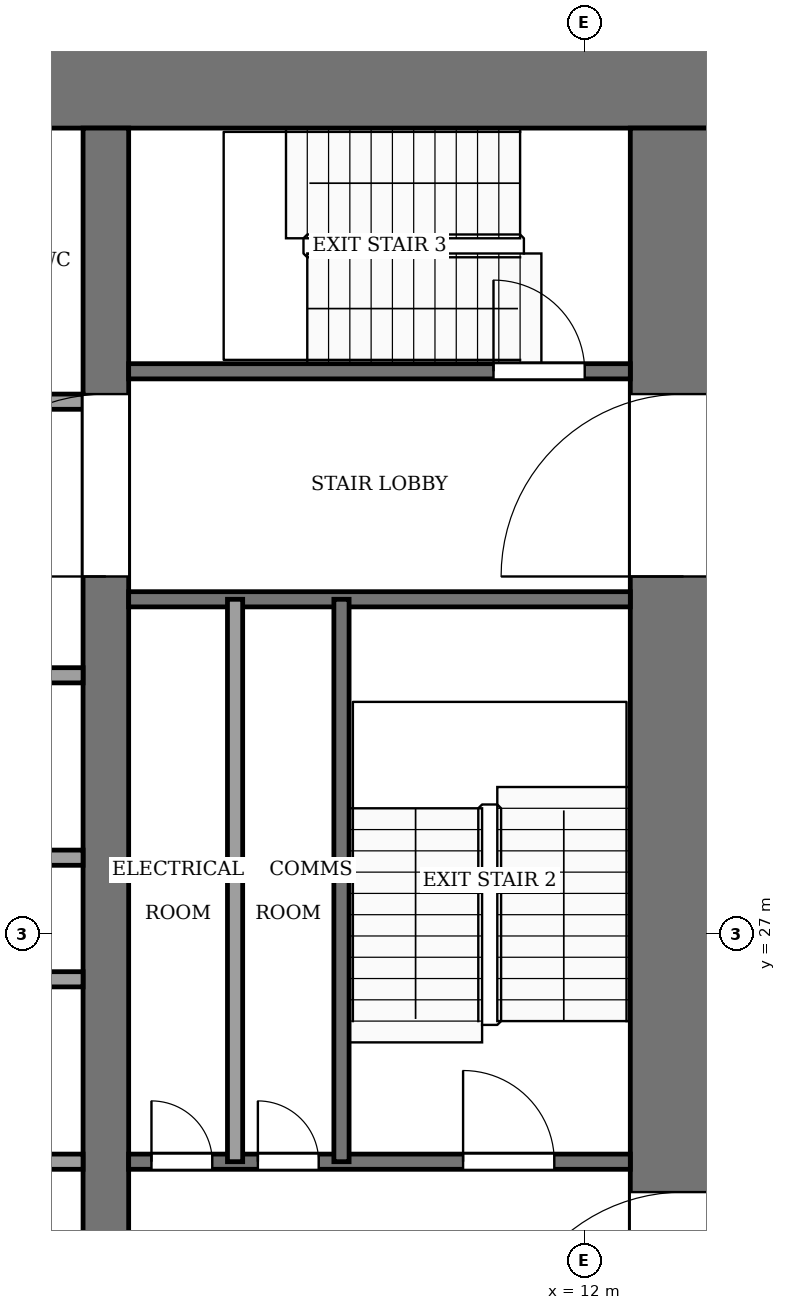
"""IFC4 building model, lengths in metres.
Left out: names, types, materials, properties, quantities, classifications, styles, units other than length and angle.
Written with IfcOpenShell. Run it as: python <this file> out.ifc"""

import sys

from ifc_helpers import new_model, si_unit, direction, frame, frame_2d, origin, place, context, subcontext, project, spatial, rectangle, extrude, element, fill, save


model = new_model("IFC4")
c1 = context("Model", 3, precision=1e-05, world=origin(), true_north=direction((0.0, 1.0)))
c2 = subcontext(c1, "Body", "Model", "MODEL_VIEW")
j1 = project(units=[si_unit("LENGTHUNIT", "METRE"), si_unit("PLANEANGLEUNIT", "RADIAN")], contexts=[c1])
p1 = place(None, origin())
s1 = spatial("IfcSite", under=j1, at=p1, CompositionType="ELEMENT")
p2 = place(p1, origin())
s2 = spatial("IfcBuilding", under=s1, at=p2, CompositionType="ELEMENT")
p3 = place(p2, frame((0.0, 0.0, 42.0)))
s3 = spatial("IfcBuildingStorey", under=s2, at=p3, CompositionType="ELEMENT", Elevation=42.0)
p4 = place(p3, frame((-14.0, 38.3, -0.13), z_axis=(0.0, 0.0, 1.0), x_axis=(1.0, 0.0, 0.0)))
e1 = element("IfcWall", 1, at=p4, inside=s3, PredefinedType="SHEAR", context=c2, shape_type="SweptSolid", body=[
    extrude(rectangle(XDim=28.0, YDim=1.4, at=frame_2d((14.0, 0.0))), origin(), (0.0, 0.0, 1.0), 4.0),
])
p5 = place(p3, frame((13.3, 18.4, -0.13), z_axis=(0.0, 0.0, 1.0), x_axis=(0.0, 1.0, 0.0)))
e2 = element("IfcWall", 2, at=p5, inside=s3, PredefinedType="SHEAR", context=c2, shape_type="SweptSolid", body=[
    extrude(rectangle(XDim=19.2, YDim=1.4, at=frame_2d((9.6, 0.0))), origin(), (0.0, 0.0, 1.0), 4.0),
])
p6 = place(p5, frame((2.8, 0.0, 0.13)))
e3 = element("IfcOpeningElement", 3, at=p6, cuts=e2, PredefinedType="OPENING", context=c2, shape_type="SweptSolid", body=[
    extrude(rectangle(XDim=2.4, YDim=2.4, at=frame_2d((1.2, 1.2))), frame((0.0, 0.71, 0.0), z_axis=(0.0, -1.0, 0.0), x_axis=(1.0, 0.0, 0.0)), (0.0, 0.0, 1.0), 1.42),
])
p7 = place(p5, frame((13.3, 0.0, 0.13)))
e4 = element("IfcOpeningElement", 4, at=p7, cuts=e2, PredefinedType="OPENING", context=c2, shape_type="SweptSolid", body=[
    extrude(rectangle(XDim=2.4, YDim=2.4, at=frame_2d((1.2, 1.2))), frame((0.0, 0.71, 0.0), z_axis=(0.0, -1.0, 0.0), x_axis=(1.0, 0.0, 0.0)), (0.0, 0.0, 1.0), 1.42),
])
p8 = place(p3, frame((5.7, 18.4, -0.13), z_axis=(0.0, 0.0, 1.0), x_axis=(0.0, 1.0, 0.0)))
e5 = element("IfcWall", 5, at=p8, inside=s3, PredefinedType="SHEAR", context=c2, shape_type="SweptSolid", body=[
    extrude(rectangle(XDim=19.2, YDim=0.6, at=frame_2d((9.6, 0.0))), origin(), (0.0, 0.0, 1.0), 4.0),
])
p9 = place(p8, frame((13.3, 0.0, 0.13)))
e6 = element("IfcOpeningElement", 6, at=p9, cuts=e5, PredefinedType="OPENING", context=c2, shape_type="SweptSolid", body=[
    extrude(rectangle(XDim=2.4, YDim=2.4, at=frame_2d((1.2, 1.2))), frame((0.0, 0.31, 0.0), z_axis=(0.0, -1.0, 0.0), x_axis=(1.0, 0.0, 0.0)), (0.0, 0.0, 1.0), 0.62),
])
p10 = place(p3, frame((-5.4, 24.0, 0.0), z_axis=(0.0, 0.0, 1.0), x_axis=(1.0, 0.0, 0.0)))
e7 = element("IfcWall", 7, at=p10, inside=s3, PredefinedType="PARTITIONING", context=c2, shape_type="SweptSolid", body=[
    extrude(rectangle(XDim=10.8, YDim=0.2, at=frame_2d((5.4, 0.0))), origin(), (0.0, 0.0, 1.0), 3.87),
])
p11 = place(p10, frame((0.75, 0.0, 0.0)))
e8 = element("IfcOpeningElement", 8, at=p11, cuts=e7, PredefinedType="OPENING", context=c2, shape_type="SweptSolid", body=[
    extrude(rectangle(XDim=1.2, YDim=2.2, at=frame_2d((0.6, 1.1))), frame((0.0, 0.11, 0.0), z_axis=(0.0, -1.0, 0.0), x_axis=(1.0, 0.0, 0.0)), (0.0, 0.0, 1.0), 0.22),
])
p12 = place(p10, frame((3.45, 0.0, 0.0)))
e9 = element("IfcOpeningElement", 9, at=p12, cuts=e7, PredefinedType="OPENING", context=c2, shape_type="SweptSolid", body=[
    extrude(rectangle(XDim=1.2, YDim=2.2, at=frame_2d((0.6, 1.1))), frame((0.0, 0.11, 0.0), z_axis=(0.0, -1.0, 0.0), x_axis=(1.0, 0.0, 0.0)), (0.0, 0.0, 1.0), 0.22),
])
p13 = place(p10, frame((6.15, 0.0, 0.0)))
e10 = element("IfcOpeningElement", 10, at=p13, cuts=e7, PredefinedType="OPENING", context=c2, shape_type="SweptSolid", body=[
    extrude(rectangle(XDim=1.2, YDim=2.2, at=frame_2d((0.6, 1.1))), frame((0.0, 0.11, 0.0), z_axis=(0.0, -1.0, 0.0), x_axis=(1.0, 0.0, 0.0)), (0.0, 0.0, 1.0), 0.22),
])
p14 = place(p10, frame((8.85, 0.0, 0.0)))
e11 = element("IfcOpeningElement", 11, at=p14, cuts=e7, PredefinedType="OPENING", context=c2, shape_type="SweptSolid", body=[
    extrude(rectangle(XDim=1.2, YDim=2.2, at=frame_2d((0.6, 1.1))), frame((0.0, 0.11, 0.0), z_axis=(0.0, -1.0, 0.0), x_axis=(1.0, 0.0, 0.0)), (0.0, 0.0, 1.0), 0.22),
])
p15 = place(p3, frame((6.0, 24.0, 0.0), z_axis=(0.0, 0.0, 1.0), x_axis=(1.0, 0.0, 0.0)))
e12 = element("IfcWall", 12, at=p15, inside=s3, PredefinedType="PARTITIONING", context=c2, shape_type="SweptSolid", body=[
    extrude(rectangle(XDim=6.6, YDim=0.2, at=frame_2d((3.3, 0.0))), origin(), (0.0, 0.0, 1.0), 3.87),
])
p16 = place(p15, frame((0.3, 0.0, 0.0)))
e13 = element("IfcOpeningElement", 13, at=p16, cuts=e12, PredefinedType="OPENING", context=c2, shape_type="SweptSolid", body=[
    extrude(rectangle(XDim=0.8, YDim=2.1, at=frame_2d((0.4, 1.05))), frame((0.0, 0.11, 0.0), z_axis=(0.0, -1.0, 0.0), x_axis=(1.0, 0.0, 0.0)), (0.0, 0.0, 1.0), 0.22),
])
p17 = place(p15, frame((1.7, 0.0, 0.0)))
e14 = element("IfcOpeningElement", 14, at=p17, cuts=e12, PredefinedType="OPENING", context=c2, shape_type="SweptSolid", body=[
    extrude(rectangle(XDim=0.8, YDim=2.1, at=frame_2d((0.4, 1.05))), frame((0.0, 0.11, 0.0), z_axis=(0.0, -1.0, 0.0), x_axis=(1.0, 0.0, 0.0)), (0.0, 0.0, 1.0), 0.22),
])
p18 = place(p15, frame((4.4, 0.0, 0.0)))
e15 = element("IfcOpeningElement", 15, at=p18, cuts=e12, PredefinedType="OPENING", context=c2, shape_type="SweptSolid", body=[
    extrude(rectangle(XDim=1.2, YDim=2.2, at=frame_2d((0.6, 1.1))), frame((0.0, 0.11, 0.0), z_axis=(0.0, -1.0, 0.0), x_axis=(1.0, 0.0, 0.0)), (0.0, 0.0, 1.0), 0.22),
])
for number, where, z_axis, x_axis in (
    (16, (-5.4, 26.4, 0.0), (0.0, 0.0, 1.0), (1.0, 0.0, 0.0)),
    (17, (-5.4, 28.0, 0.0), (0.0, 0.0, 1.0), (1.0, 0.0, 0.0)),
    (18, (-5.4, 30.4, 0.0), (0.0, 0.0, 1.0), (1.0, 0.0, 0.0)),
):
    element("IfcWall", number, at=place(p3, frame(where, z_axis=z_axis, x_axis=x_axis)), inside=s3, PredefinedType="PARTITIONING", context=c2, shape_type="SweptSolid", body=[
        extrude(rectangle(XDim=10.8, YDim=0.2, at=frame_2d((5.4, 0.0))), origin(), (0.0, 0.0, 1.0), 3.87),
    ])
p19 = place(p3, frame((6.0, 31.4, 0.0), z_axis=(0.0, 0.0, 1.0), x_axis=(1.0, 0.0, 0.0)))
e19 = element("IfcWall", 19, at=p19, inside=s3, PredefinedType="PARTITIONING", context=c2, shape_type="SweptSolid", body=[
    extrude(rectangle(XDim=6.6, YDim=0.2, at=frame_2d((3.3, 0.0))), origin(), (0.0, 0.0, 1.0), 3.87),
])
p20 = place(p3, frame((-5.4, 34.0, 0.0), z_axis=(0.0, 0.0, 1.0), x_axis=(1.0, 0.0, 0.0)))
e20 = element("IfcWall", 20, at=p20, inside=s3, PredefinedType="PARTITIONING", context=c2, shape_type="SweptSolid", body=[
    extrude(rectangle(XDim=10.8, YDim=0.2, at=frame_2d((5.4, 0.0))), origin(), (0.0, 0.0, 1.0), 3.87),
])
p21 = place(p20, frame((6.15, 0.0, 0.0)))
e21 = element("IfcOpeningElement", 21, at=p21, cuts=e20, PredefinedType="OPENING", context=c2, shape_type="SweptSolid", body=[
    extrude(rectangle(XDim=1.2, YDim=2.2, at=frame_2d((0.6, 1.1))), frame((0.0, 0.11, 0.0), z_axis=(0.0, -1.0, 0.0), x_axis=(1.0, 0.0, 0.0)), (0.0, 0.0, 1.0), 0.22),
])
p22 = place(p20, frame((8.95, 0.0, 0.0)))
e22 = element("IfcOpeningElement", 22, at=p22, cuts=e20, PredefinedType="OPENING", context=c2, shape_type="SweptSolid", body=[
    extrude(rectangle(XDim=1.0, YDim=2.1, at=frame_2d((0.5, 1.05))), frame((0.0, 0.11, 0.0), z_axis=(0.0, -1.0, 0.0), x_axis=(1.0, 0.0, 0.0)), (0.0, 0.0, 1.0), 0.22),
])
p23 = place(p3, frame((6.0, 34.4, 0.0), z_axis=(0.0, 0.0, 1.0), x_axis=(1.0, 0.0, 0.0)))
e23 = element("IfcWall", 23, at=p23, inside=s3, PredefinedType="PARTITIONING", context=c2, shape_type="SweptSolid", body=[
    extrude(rectangle(XDim=6.6, YDim=0.2, at=frame_2d((3.3, 0.0))), origin(), (0.0, 0.0, 1.0), 3.87),
])
p24 = place(p23, frame((4.8, 0.0, 0.0)))
e24 = element("IfcOpeningElement", 24, at=p24, cuts=e23, PredefinedType="OPENING", context=c2, shape_type="SweptSolid", body=[
    extrude(rectangle(XDim=1.2, YDim=2.2, at=frame_2d((0.6, 1.1))), frame((0.0, 0.11, 0.0), z_axis=(0.0, -1.0, 0.0), x_axis=(1.0, 0.0, 0.0)), (0.0, 0.0, 1.0), 0.22),
])
for number, where, z_axis, x_axis in (
    (25, (7.4, 24.0, 0.0), (0.0, 0.0, 1.0), (0.0, 1.0, 0.0)),
    (26, (8.8, 24.0, 0.0), (0.0, 0.0, 1.0), (0.0, 1.0, 0.0)),
):
    element("IfcWall", number, at=place(p3, frame(where, z_axis=z_axis, x_axis=x_axis)), inside=s3, PredefinedType="PARTITIONING", context=c2, shape_type="SweptSolid", body=[
        extrude(rectangle(XDim=7.4, YDim=0.2, at=frame_2d((3.7, 0.0))), origin(), (0.0, 0.0, 1.0), 3.87),
    ])
p25 = place(p16, origin())
e27 = element("IfcDoor", 27, at=p25, inside=s3, OperationType="SINGLE_SWING_LEFT", PredefinedType="DOOR", context=c2, shape_type="SweptSolid", body=[
    extrude(rectangle(XDim=0.8, YDim=2.1, at=frame_2d((0.4, 1.05))), frame((0.0, 0.025, 0.0), z_axis=(0.0, -1.0, 0.0), x_axis=(1.0, 0.0, 0.0)), (0.0, 0.0, 1.0), 0.05),
])
fill(e13, e27)
p26 = place(p17, origin())
e28 = element("IfcDoor", 28, at=p26, inside=s3, OperationType="SINGLE_SWING_RIGHT", PredefinedType="DOOR", context=c2, shape_type="SweptSolid", body=[
    extrude(rectangle(XDim=0.8, YDim=2.1, at=frame_2d((0.4, 1.05))), frame((0.0, 0.025, 0.0), z_axis=(0.0, -1.0, 0.0), x_axis=(1.0, 0.0, 0.0)), (0.0, 0.0, 1.0), 0.05),
])
fill(e14, e28)
p27 = place(p18, origin())
e29 = element("IfcDoor", 29, at=p27, inside=s3, OperationType="SINGLE_SWING_LEFT", PredefinedType="DOOR", context=c2, shape_type="SweptSolid", body=[
    extrude(rectangle(XDim=1.2, YDim=2.2, at=frame_2d((0.6, 1.1))), frame((0.0, 0.025, 0.0), z_axis=(0.0, -1.0, 0.0), x_axis=(1.0, 0.0, 0.0)), (0.0, 0.0, 1.0), 0.05),
])
fill(e15, e29)
p28 = place(p24, origin())
e30 = element("IfcDoor", 30, at=p28, inside=s3, OperationType="SINGLE_SWING_RIGHT", PredefinedType="DOOR", context=c2, shape_type="SweptSolid", body=[
    extrude(rectangle(XDim=1.2, YDim=2.2, at=frame_2d((0.6, 1.1))), frame((0.0, 0.025, 0.0), z_axis=(0.0, -1.0, 0.0), x_axis=(1.0, 0.0, 0.0)), (0.0, 0.0, 1.0), 0.05),
])
fill(e24, e30)
p29 = place(p9, origin())
e31 = element("IfcDoor", 31, at=p29, inside=s3, OperationType="DOUBLE_DOOR_SINGLE_SWING", PredefinedType="DOOR", context=c2, shape_type="SweptSolid", body=[
    extrude(rectangle(XDim=2.4, YDim=2.4, at=frame_2d((1.2, 1.2))), frame((0.0, 0.025, 0.0), z_axis=(0.0, -1.0, 0.0), x_axis=(1.0, 0.0, 0.0)), (0.0, 0.0, 1.0), 0.05),
])
fill(e6, e31)
p30 = place(p6, origin())
e32 = element("IfcDoor", 32, at=p30, inside=s3, OperationType="DOUBLE_DOOR_SINGLE_SWING", PredefinedType="DOOR", context=c2, shape_type="SweptSolid", body=[
    extrude(rectangle(XDim=2.4, YDim=2.4, at=frame_2d((1.2, 1.2))), frame((0.0, 0.025, 0.0), z_axis=(0.0, -1.0, 0.0), x_axis=(1.0, 0.0, 0.0)), (0.0, 0.0, 1.0), 0.05),
])
fill(e3, e32)
p31 = place(p7, origin())
e33 = element("IfcDoor", 33, at=p31, inside=s3, OperationType="DOUBLE_DOOR_SINGLE_SWING", PredefinedType="DOOR", context=c2, shape_type="SweptSolid", body=[
    extrude(rectangle(XDim=2.4, YDim=2.4, at=frame_2d((1.2, 1.2))), frame((0.0, 0.025, 0.0), z_axis=(0.0, -1.0, 0.0), x_axis=(1.0, 0.0, 0.0)), (0.0, 0.0, 1.0), 0.05),
])
fill(e4, e33)
save(model, sys.argv[1])
